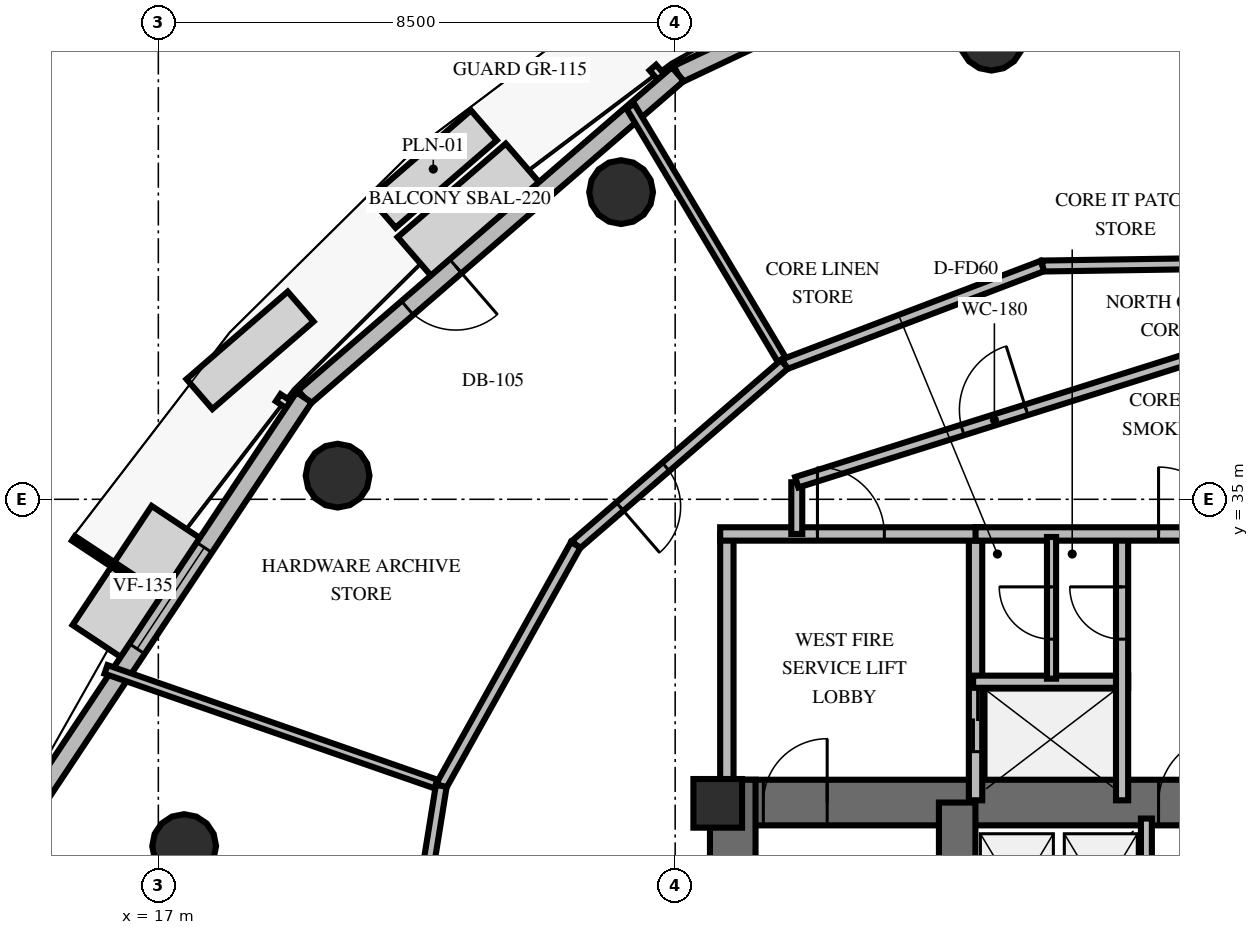
"""IFC4 building model, lengths in metres.
Left out: names, types, materials, properties, quantities, classifications, styles, units other than length and angle.
Written with IfcOpenShell. Run it as: python <this file> out.ifc"""

import sys

from ifc_helpers import new_model, si_unit, direction, frame, frame_2d, origin, origin_2d, place, context, subcontext, project, spatial, rectangle, circle, extrude, element, fill, save


model = new_model("IFC4")
c1 = context("Model", 3, precision=1e-05, world=origin(), true_north=direction((0.0, 1.0)))
c2 = subcontext(c1, "Body", "Model", "MODEL_VIEW")
j1 = project(units=[si_unit("LENGTHUNIT", "METRE"), si_unit("PLANEANGLEUNIT", "RADIAN")], contexts=[c1])
p1 = place(None, origin())
s1 = spatial("IfcSite", under=j1, at=p1, CompositionType="ELEMENT")
p2 = place(p1, origin())
s2 = spatial("IfcBuilding", under=s1, at=p2, CompositionType="ELEMENT")
p3 = place(p2, frame((0.0, 0.0, 202.4)))
s3 = spatial("IfcBuildingStorey", under=s2, at=p3, CompositionType="ELEMENT", Elevation=202.4)
p4 = place(p3, frame((26.072, 30.013, 0.0), z_axis=(0.0, 0.0, 1.0), x_axis=(1.0, 0.0, 0.0)))
e1 = element("IfcWall", 1, at=p4, inside=s3, PredefinedType="SHEAR", context=c2, shape_type="SweptSolid", body=[
    extrude(rectangle(XDim=15.866, YDim=0.75, at=frame_2d((7.933, 0.0))), origin(), (0.0, 0.0, 1.0), 3.6),
])
p5 = place(p4, frame((0.878, 0.0, 0.0)))
e2 = element("IfcOpeningElement", 2, at=p5, cuts=e1, PredefinedType="OPENING", context=c2, shape_type="SweptSolid", body=[
    extrude(rectangle(XDim=1.05, YDim=2.15, at=frame_2d((0.525, 1.075))), frame((0.0, 0.385, 0.0), z_axis=(0.0, -1.0, 0.0), x_axis=(1.0, 0.0, 0.0)), (0.0, 0.0, 1.0), 0.77),
])
p6 = place(p4, frame((13.928, 0.0, 0.0)))
e3 = element("IfcOpeningElement", 3, at=p6, cuts=e1, PredefinedType="OPENING", context=c2, shape_type="SweptSolid", body=[
    extrude(rectangle(XDim=1.05, YDim=2.15, at=frame_2d((0.525, 1.075))), frame((0.0, 0.385, 0.0), z_axis=(0.0, -1.0, 0.0), x_axis=(1.0, 0.0, 0.0)), (0.0, 0.0, 1.0), 0.77),
])
p7 = place(p4, frame((7.378, 0.0, 0.0)))
e4 = element("IfcOpeningElement", 4, at=p7, cuts=e1, PredefinedType="OPENING", context=c2, shape_type="SweptSolid", body=[
    extrude(rectangle(XDim=1.1, YDim=2.15, at=frame_2d((0.55, 1.075))), frame((0.0, 0.385, 0.0), z_axis=(0.0, -1.0, 0.0), x_axis=(1.0, 0.0, 0.0)), (0.0, 0.0, 1.0), 0.77),
])
p8 = place(p3, frame((26.447, 19.812, 0.0), z_axis=(0.0, 0.0, 1.0), x_axis=(0.0, 1.0, 0.0)))
e5 = element("IfcWall", 5, at=p8, inside=s3, PredefinedType="SHEAR", context=c2, shape_type="SweptSolid", body=[
    extrude(rectangle(XDim=10.576, YDim=0.75, at=frame_2d((5.288, 0.0))), origin(), (0.0, 0.0, 1.0), 3.6),
])
p9 = place(p3, frame((30.138, 20.187, 0.0), z_axis=(0.0, 0.0, 1.0), x_axis=(0.0, 1.0, 0.0)))
e6 = element("IfcWall", 6, at=p9, inside=s3, PredefinedType="SHEAR", context=c2, shape_type="SweptSolid", body=[
    extrude(rectangle(XDim=9.826, YDim=0.6, at=frame_2d((4.913, 0.0))), origin(), (0.0, 0.0, 1.0), 3.6),
])
p10 = place(p3, frame((26.2, 30.0, 0.0), z_axis=(0.0, 0.0, 1.0), x_axis=(1.0, 0.0, 0.0)))
e7 = element("IfcColumn", 7, at=p10, inside=s3, PredefinedType="PILASTER", context=c2, shape_type="SweptSolid", body=[
    extrude(rectangle(XDim=0.8, YDim=0.8, at=origin_2d()), origin(), (0.0, 0.0, 1.0), 3.6),
])
for number, where, z_axis, x_axis in (
    (8, (30.703, 42.575, 0.0), (0.0, 0.0, 1.0), (1.0, 0.0, 0.0)),
    (9, (24.611, 40.052, 0.0), (0.0, 0.0, 1.0), (1.0, 0.0, 0.0)),
    (10, (19.948, 35.389, 0.0), (0.0, 0.0, 1.0), (1.0, 0.0, 0.0)),
    (11, (17.425, 29.297, 0.0), (0.0, 0.0, 1.0), (1.0, 0.0, 0.0)),
):
    element("IfcColumn", number, at=place(p3, frame(where, z_axis=z_axis, x_axis=x_axis)), inside=s3, PredefinedType="COLUMN", context=c2, shape_type="SweptSolid", body=[
        extrude(circle(Radius=0.525, at=origin_2d()), origin(), (0.0, 0.0, 1.0), 3.6),
    ])
p11 = place(p3, frame((32.711, 45.379, 0.0), z_axis=(0.0, 0.0, 1.0), x_axis=(-0.90415381925, -0.427207058855, 0.0)))
e12 = element("IfcWall", 12, at=p11, inside=s3, PredefinedType="SOLIDWALL", context=c2, shape_type="SweptSolid", body=[
    extrude(rectangle(XDim=7.927, YDim=0.3, at=frame_2d((3.963, 0.0))), origin(), (0.0, 0.0, 1.0), 2.66),
])
p12 = place(p11, frame((2.964, 0.0, 0.8)))
e13 = element("IfcOpeningElement", 13, at=p12, cuts=e12, PredefinedType="OPENING", context=c2, shape_type="SweptSolid", body=[
    extrude(rectangle(XDim=2.0, YDim=1.85, at=frame_2d((1.0, 0.925))), frame((0.0, 0.16, 0.0), z_axis=(0.0, -1.0, 0.0), x_axis=(1.0, 0.0, 0.0)), (0.0, 0.0, 1.0), 0.32),
])
p13 = place(p3, frame((25.543, 41.992, 0.0), z_axis=(0.0, 0.0, 1.0), x_axis=(-0.756414189181, -0.65409294019, 0.0)))
e14 = element("IfcWall", 14, at=p13, inside=s3, PredefinedType="SOLIDWALL", context=c2, shape_type="SweptSolid", body=[
    extrude(rectangle(XDim=8.127, YDim=0.3, at=frame_2d((4.063, 0.0))), origin(), (0.0, 0.0, 1.0), 2.66),
])
p14 = place(p13, frame((4.83, 0.0, 0.0)))
e15 = element("IfcOpeningElement", 15, at=p14, cuts=e14, PredefinedType="OPENING", context=c2, shape_type="SweptSolid", body=[
    extrude(rectangle(XDim=1.05, YDim=2.15, at=frame_2d((0.525, 1.075))), frame((0.0, 0.16, 0.0), z_axis=(0.0, -1.0, 0.0), x_axis=(1.0, 0.0, 0.0)), (0.0, 0.0, 1.0), 0.32),
])
p15 = place(p3, frame((19.396, 36.677, 0.0), z_axis=(0.0, 0.0, 1.0), x_axis=(-0.553263688025, -0.833006177356, 0.0)))
e16 = element("IfcWall", 16, at=p15, inside=s3, PredefinedType="SOLIDWALL", context=c2, shape_type="SweptSolid", body=[
    extrude(rectangle(XDim=7.927, YDim=0.3, at=frame_2d((3.963, 0.0))), origin(), (0.0, 0.0, 1.0), 2.66),
])
p16 = place(p15, frame((2.964, 0.0, 0.8)))
e17 = element("IfcOpeningElement", 17, at=p16, cuts=e16, PredefinedType="OPENING", context=c2, shape_type="SweptSolid", body=[
    extrude(rectangle(XDim=2.0, YDim=1.85, at=frame_2d((1.0, 0.925))), frame((0.0, 0.16, 0.0), z_axis=(0.0, -1.0, 0.0), x_axis=(1.0, 0.0, 0.0)), (0.0, 0.0, 1.0), 0.32),
])
p17 = place(p3, frame((26.35, 30.05, 0.0), z_axis=(0.0, 0.0, 1.0), x_axis=(0.0, 1.0, 0.0)))
e18 = element("IfcWall", 18, at=p17, inside=s3, PredefinedType="SOLIDWALL", context=c2, shape_type="SweptSolid", body=[
    extrude(rectangle(XDim=4.38, YDim=0.22, at=frame_2d((2.19, 0.0))), origin(), (0.0, 0.0, 1.0), 2.46),
])
p18 = place(p3, frame((30.44, 30.05, 0.0), z_axis=(0.0, 0.0, 1.0), x_axis=(0.0, 1.0, 0.0)))
e19 = element("IfcWall", 19, at=p18, inside=s3, PredefinedType="SOLIDWALL", context=c2, shape_type="SweptSolid", body=[
    extrude(rectangle(XDim=4.38, YDim=0.22, at=frame_2d((2.19, 0.0))), origin(), (0.0, 0.0, 1.0), 2.46),
])
p19 = place(p18, frame((0.8, 0.0, 0.0)))
e20 = element("IfcOpeningElement", 20, at=p19, cuts=e19, PredefinedType="OPENING", context=c2, shape_type="SweptSolid", body=[
    extrude(rectangle(XDim=1.05, YDim=2.1, at=frame_2d((0.525, 1.05))), frame((0.0, 0.12, 0.0), z_axis=(0.0, -1.0, 0.0), x_axis=(1.0, 0.0, 0.0)), (0.0, 0.0, 1.0), 0.24),
])
p20 = place(p3, frame((26.24, 34.43, 0.0), z_axis=(0.0, 0.0, 1.0), x_axis=(1.0, 0.0, 0.0)))
e21 = element("IfcWall", 21, at=p20, inside=s3, PredefinedType="SOLIDWALL", context=c2, shape_type="SweptSolid", body=[
    extrude(rectangle(XDim=4.31, YDim=0.22, at=frame_2d((2.155, 0.0))), origin(), (0.0, 0.0, 1.0), 2.46),
])
p21 = place(p20, frame((1.6, 0.0, 0.0)))
e22 = element("IfcOpeningElement", 22, at=p21, cuts=e21, PredefinedType="OPENING", context=c2, shape_type="SweptSolid", body=[
    extrude(rectangle(XDim=1.1, YDim=2.15, at=frame_2d((0.55, 1.075))), frame((0.0, 0.12, 0.0), z_axis=(0.0, -1.0, 0.0), x_axis=(1.0, 0.0, 0.0)), (0.0, 0.0, 1.0), 0.24),
])
p22 = place(p3, frame((30.4, 32.0, 0.0), z_axis=(0.0, 0.0, 1.0), x_axis=(1.0, 0.0, 0.0)))
e23 = element("IfcWall", 23, at=p22, inside=s3, PredefinedType="SOLIDWALL", context=c2, shape_type="SweptSolid", body=[
    extrude(rectangle(XDim=2.55, YDim=0.2, at=frame_2d((1.275, 0.0))), origin(), (0.0, 0.0, 1.0), 2.46),
])
p23 = place(p3, frame((32.85, 30.05, 0.0), z_axis=(0.0, 0.0, 1.0), x_axis=(0.0, 1.0, 0.0)))
e24 = element("IfcWall", 24, at=p23, inside=s3, PredefinedType="SOLIDWALL", context=c2, shape_type="SweptSolid", body=[
    extrude(rectangle(XDim=4.38, YDim=0.2, at=frame_2d((2.19, 0.0))), origin(), (0.0, 0.0, 1.0), 2.46),
])
p24 = place(p23, frame((2.65, 0.0, 0.0)))
e25 = element("IfcOpeningElement", 25, at=p24, cuts=e24, PredefinedType="OPENING", context=c2, shape_type="SweptSolid", body=[
    extrude(rectangle(XDim=0.86, YDim=2.05, at=frame_2d((0.43, 1.025))), frame((0.0, 0.11, 0.0), z_axis=(0.0, -1.0, 0.0), x_axis=(1.0, 0.0, 0.0)), (0.0, 0.0, 1.0), 0.22),
])
p25 = place(p3, frame((30.44, 34.43, 0.0), z_axis=(0.0, 0.0, 1.0), x_axis=(1.0, 0.0, 0.0)))
e26 = element("IfcWall", 26, at=p25, inside=s3, PredefinedType="SOLIDWALL", context=c2, shape_type="SweptSolid", body=[
    extrude(rectangle(XDim=7.12, YDim=0.22, at=frame_2d((3.56, 0.0))), origin(), (0.0, 0.0, 1.0), 2.46),
])
p26 = place(p25, frame((3.01, 0.0, 0.0)))
e27 = element("IfcOpeningElement", 27, at=p26, cuts=e26, PredefinedType="OPENING", context=c2, shape_type="SweptSolid", body=[
    extrude(rectangle(XDim=1.1, YDim=2.15, at=frame_2d((0.55, 1.075))), frame((0.0, 0.12, 0.0), z_axis=(0.0, -1.0, 0.0), x_axis=(1.0, 0.0, 0.0)), (0.0, 0.0, 1.0), 0.24),
])
p27 = place(p3, frame((31.69, 32.05, 0.0), z_axis=(0.0, 0.0, 1.0), x_axis=(0.0, 1.0, 0.0)))
e28 = element("IfcWall", 28, at=p27, inside=s3, PredefinedType="PARTITIONING", context=c2, shape_type="SweptSolid", body=[
    extrude(rectangle(XDim=2.33, YDim=0.15, at=frame_2d((1.165, 0.0))), origin(), (0.0, 0.0, 1.0), 2.46),
])
p28 = place(p27, frame((0.65, 0.0, 0.0)))
e29 = element("IfcOpeningElement", 29, at=p28, cuts=e28, PredefinedType="OPENING", context=c2, shape_type="SweptSolid", body=[
    extrude(rectangle(XDim=0.86, YDim=2.05, at=frame_2d((0.43, 1.025))), frame((0.0, 0.085, 0.0), z_axis=(0.0, -1.0, 0.0), x_axis=(1.0, 0.0, 0.0)), (0.0, 0.0, 1.0), 0.17),
])
p29 = place(p3, frame((33.25, 27.28, 0.0), z_axis=(0.0, 0.0, 1.0), x_axis=(0.0, 1.0, 0.0)))
e30 = element("IfcWall", 30, at=p29, inside=s3, PredefinedType="SOLIDWALL", context=c2, shape_type="SweptSolid", body=[
    extrude(rectangle(XDim=2.47, YDim=0.18, at=frame_2d((1.235, 0.0))), origin(), (0.0, 0.0, 1.0), 2.46),
])
p30 = place(p3, frame((27.5, 34.43, 0.0), z_axis=(0.0, 0.0, 1.0), x_axis=(0.0, 1.0, 0.0)))
e31 = element("IfcWall", 31, at=p30, inside=s3, PredefinedType="PARTITIONING", context=c2, shape_type="SweptSolid", body=[
    extrude(rectangle(XDim=0.85, YDim=0.18, at=frame_2d((0.425, 0.0))), origin(), (0.0, 0.0, 1.0), 2.46),
])
p31 = place(p3, frame((27.5, 35.28, 0.0), z_axis=(0.0, 0.0, 1.0), x_axis=(0.953691418528, 0.300786765376, 0.0)))
e32 = element("IfcWall", 32, at=p31, inside=s3, PredefinedType="PARTITIONING", context=c2, shape_type="SweptSolid", body=[
    extrude(rectangle(XDim=6.816, YDim=0.18, at=frame_2d((3.408, 0.0))), origin(), (0.0, 0.0, 1.0), 2.46),
])
p32 = place(p31, frame((2.858, 0.0, 0.0)))
e33 = element("IfcOpeningElement", 33, at=p32, cuts=e32, PredefinedType="OPENING", context=c2, shape_type="SweptSolid", body=[
    extrude(rectangle(XDim=1.1, YDim=2.15, at=frame_2d((0.55, 1.075))), frame((0.0, 0.1, 0.0), z_axis=(0.0, -1.0, 0.0), x_axis=(1.0, 0.0, 0.0)), (0.0, 0.0, 1.0), 0.2),
])
p33 = place(p3, frame((27.298, 37.221, 0.0), z_axis=(0.0, 0.0, 1.0), x_axis=(-0.512780558494, 0.858519713711, 0.0)))
e34 = element("IfcWall", 34, at=p33, inside=s3, PredefinedType="PARTITIONING", context=c2, shape_type="SweptSolid", body=[
    extrude(rectangle(XDim=4.943, YDim=0.15, at=frame_2d((2.471, 0.0))), origin(), (0.0, 0.0, 1.0), 2.46),
])
p34 = place(p3, frame((36.078, 38.904, 0.0), z_axis=(0.0, 0.0, 1.0), x_axis=(-0.999889806088, -0.014845055755, 0.0)))
e35 = element("IfcWall", 35, at=p34, inside=s3, PredefinedType="PARTITIONING", context=c2, shape_type="SweptSolid", body=[
    extrude(rectangle(XDim=4.539, YDim=0.18, at=frame_2d((2.27, 0.0))), origin(), (0.0, 0.0, 1.0), 2.46),
])
p35 = place(p3, frame((31.54, 38.836, 0.0), z_axis=(0.0, 0.0, 1.0), x_axis=(-0.934506478346, -0.355946122227, 0.0)))
e36 = element("IfcWall", 36, at=p35, inside=s3, PredefinedType="PARTITIONING", context=c2, shape_type="SweptSolid", body=[
    extrude(rectangle(XDim=4.539, YDim=0.18, at=frame_2d((2.27, 0.0))), origin(), (0.0, 0.0, 1.0), 2.46),
])
p36 = place(p3, frame((21.653, 30.288, 0.0), z_axis=(0.0, 0.0, 1.0), x_axis=(-0.94466988428, 0.328022575039, 0.0)))
e37 = element("IfcWall", 37, at=p36, inside=s3, PredefinedType="PARTITIONING", context=c2, shape_type="SweptSolid", body=[
    extrude(rectangle(XDim=5.837, YDim=0.15, at=frame_2d((2.919, 0.0))), origin(), (0.0, 0.0, 1.0), 2.46),
])
p37 = place(p3, frame((27.298, 37.221, 0.0), z_axis=(0.0, 0.0, 1.0), x_axis=(-0.756428618382, -0.654076253423, 0.0)))
e38 = element("IfcWall", 38, at=p37, inside=s3, PredefinedType="PARTITIONING", context=c2, shape_type="SweptSolid", body=[
    extrude(rectangle(XDim=4.539, YDim=0.18, at=frame_2d((2.27, 0.0))), origin(), (0.0, 0.0, 1.0), 2.46),
])
p38 = place(p37, frame((2.579, 0.0, 0.0)))
e39 = element("IfcOpeningElement", 39, at=p38, cuts=e38, PredefinedType="OPENING", context=c2, shape_type="SweptSolid", body=[
    extrude(rectangle(XDim=1.0, YDim=2.15, at=frame_2d((0.5, 1.075))), frame((0.0, 0.1, 0.0), z_axis=(0.0, -1.0, 0.0), x_axis=(1.0, 0.0, 0.0)), (0.0, 0.0, 1.0), 0.2),
])
p39 = place(p3, frame((23.864, 34.252, 0.0), z_axis=(0.0, 0.0, 1.0), x_axis=(-0.487099084589, -0.873346713392, 0.0)))
e40 = element("IfcWall", 40, at=p39, inside=s3, PredefinedType="PARTITIONING", context=c2, shape_type="SweptSolid", body=[
    extrude(rectangle(XDim=4.539, YDim=0.18, at=frame_2d((2.27, 0.0))), origin(), (0.0, 0.0, 1.0), 2.46),
])
p40 = place(p3, frame((21.653, 30.288, 0.0), z_axis=(0.0, 0.0, 1.0), x_axis=(-0.159041352882, -0.987271922053, 0.0)))
e41 = element("IfcWall", 41, at=p40, inside=s3, PredefinedType="PARTITIONING", context=c2, shape_type="SweptSolid", body=[
    extrude(rectangle(XDim=4.539, YDim=0.18, at=frame_2d((2.27, 0.0))), origin(), (0.0, 0.0, 1.0), 2.46),
])
p41 = place(p14, origin())
e42 = element("IfcDoor", 42, at=p41, inside=s3, OperationType="SINGLE_SWING_LEFT", PredefinedType="DOOR", context=c2, shape_type="SweptSolid", body=[
    extrude(rectangle(XDim=1.05, YDim=2.15, at=frame_2d((0.525, 1.075))), frame((0.0, 0.025, 0.0), z_axis=(0.0, -1.0, 0.0), x_axis=(1.0, 0.0, 0.0)), (0.0, 0.0, 1.0), 0.05),
])
fill(e15, e42)
p42 = place(p16, origin())
e43 = element("IfcWindow", 43, at=p42, inside=s3, PartitioningType="SINGLE_PANEL", PredefinedType="WINDOW", context=c2, shape_type="SweptSolid", body=[
    extrude(rectangle(XDim=2.0, YDim=1.85, at=frame_2d((1.0, 0.925))), frame((0.0, 0.03, 0.0), z_axis=(0.0, -1.0, 0.0), x_axis=(1.0, 0.0, 0.0)), (0.0, 0.0, 1.0), 0.06),
])
fill(e17, e43)
p43 = place(p5, origin())
e44 = element("IfcDoor", 44, at=p43, inside=s3, OperationType="SINGLE_SWING_RIGHT", PredefinedType="DOOR", context=c2, shape_type="SweptSolid", body=[
    extrude(rectangle(XDim=1.05, YDim=2.15, at=frame_2d((0.525, 1.075))), frame((0.0, 0.025, 0.0), z_axis=(0.0, -1.0, 0.0), x_axis=(1.0, 0.0, 0.0)), (0.0, 0.0, 1.0), 0.05),
])
fill(e2, e44)
p44 = place(p7, origin())
e45 = element("IfcDoor", 45, at=p44, inside=s3, OperationType="SINGLE_SWING_RIGHT", PredefinedType="DOOR", context=c2, shape_type="SweptSolid", body=[
    extrude(rectangle(XDim=1.1, YDim=2.15, at=frame_2d((0.55, 1.075))), frame((0.0, 0.025, 0.0), z_axis=(0.0, -1.0, 0.0), x_axis=(1.0, 0.0, 0.0)), (0.0, 0.0, 1.0), 0.05),
])
fill(e4, e45)
p45 = place(p21, origin())
e46 = element("IfcDoor", 46, at=p45, inside=s3, OperationType="SINGLE_SWING_LEFT", PredefinedType="DOOR", context=c2, shape_type="SweptSolid", body=[
    extrude(rectangle(XDim=1.1, YDim=2.15, at=frame_2d((0.55, 1.075))), frame((0.0, 0.025, 0.0), z_axis=(0.0, -1.0, 0.0), x_axis=(1.0, 0.0, 0.0)), (0.0, 0.0, 1.0), 0.05),
])
fill(e22, e46)
p46 = place(p19, origin())
e47 = element("IfcDoor", 47, at=p46, inside=s3, OperationType="DOUBLE_DOOR_SLIDING", PredefinedType="USERDEFINED", context=c2, shape_type="SweptSolid", body=[
    extrude(rectangle(XDim=1.05, YDim=2.1, at=frame_2d((0.525, 1.05))), frame((0.0, 0.025, 0.0), z_axis=(0.0, -1.0, 0.0), x_axis=(1.0, 0.0, 0.0)), (0.0, 0.0, 1.0), 0.05),
])
fill(e20, e47)
p47 = place(p24, origin())
e48 = element("IfcDoor", 48, at=p47, inside=s3, OperationType="SINGLE_SWING_RIGHT", PredefinedType="TRAPDOOR", context=c2, shape_type="SweptSolid", body=[
    extrude(rectangle(XDim=0.86, YDim=2.05, at=frame_2d((0.43, 1.025))), frame((0.0, 0.025, 0.0), z_axis=(0.0, -1.0, 0.0), x_axis=(1.0, 0.0, 0.0)), (0.0, 0.0, 1.0), 0.05),
])
fill(e25, e48)
p48 = place(p26, origin())
e49 = element("IfcDoor", 49, at=p48, inside=s3, OperationType="SINGLE_SWING_LEFT", PredefinedType="DOOR", context=c2, shape_type="SweptSolid", body=[
    extrude(rectangle(XDim=1.1, YDim=2.15, at=frame_2d((0.55, 1.075))), frame((0.0, 0.025, 0.0), z_axis=(0.0, -1.0, 0.0), x_axis=(1.0, 0.0, 0.0)), (0.0, 0.0, 1.0), 0.05),
])
fill(e27, e49)
p49 = place(p28, origin())
e50 = element("IfcDoor", 50, at=p49, inside=s3, OperationType="SINGLE_SWING_RIGHT", PredefinedType="TRAPDOOR", context=c2, shape_type="SweptSolid", body=[
    extrude(rectangle(XDim=0.86, YDim=2.05, at=frame_2d((0.43, 1.025))), frame((0.0, 0.025, 0.0), z_axis=(0.0, -1.0, 0.0), x_axis=(1.0, 0.0, 0.0)), (0.0, 0.0, 1.0), 0.05),
])
fill(e29, e50)
p50 = place(p32, origin())
e51 = element("IfcDoor", 51, at=p50, inside=s3, OperationType="SINGLE_SWING_RIGHT", PredefinedType="DOOR", context=c2, shape_type="SweptSolid", body=[
    extrude(rectangle(XDim=1.1, YDim=2.15, at=frame_2d((0.55, 1.075))), frame((0.0, 0.025, 0.0), z_axis=(0.0, -1.0, 0.0), x_axis=(1.0, 0.0, 0.0)), (0.0, 0.0, 1.0), 0.05),
])
fill(e33, e51)
p51 = place(p38, origin())
e52 = element("IfcDoor", 52, at=p51, inside=s3, OperationType="SINGLE_SWING_RIGHT", PredefinedType="DOOR", context=c2, shape_type="SweptSolid", body=[
    extrude(rectangle(XDim=1.0, YDim=2.15, at=frame_2d((0.5, 1.075))), frame((0.0, 0.025, 0.0), z_axis=(0.0, -1.0, 0.0), x_axis=(1.0, 0.0, 0.0)), (0.0, 0.0, 1.0), 0.05),
])
fill(e39, e52)
save(model, sys.argv[1])
